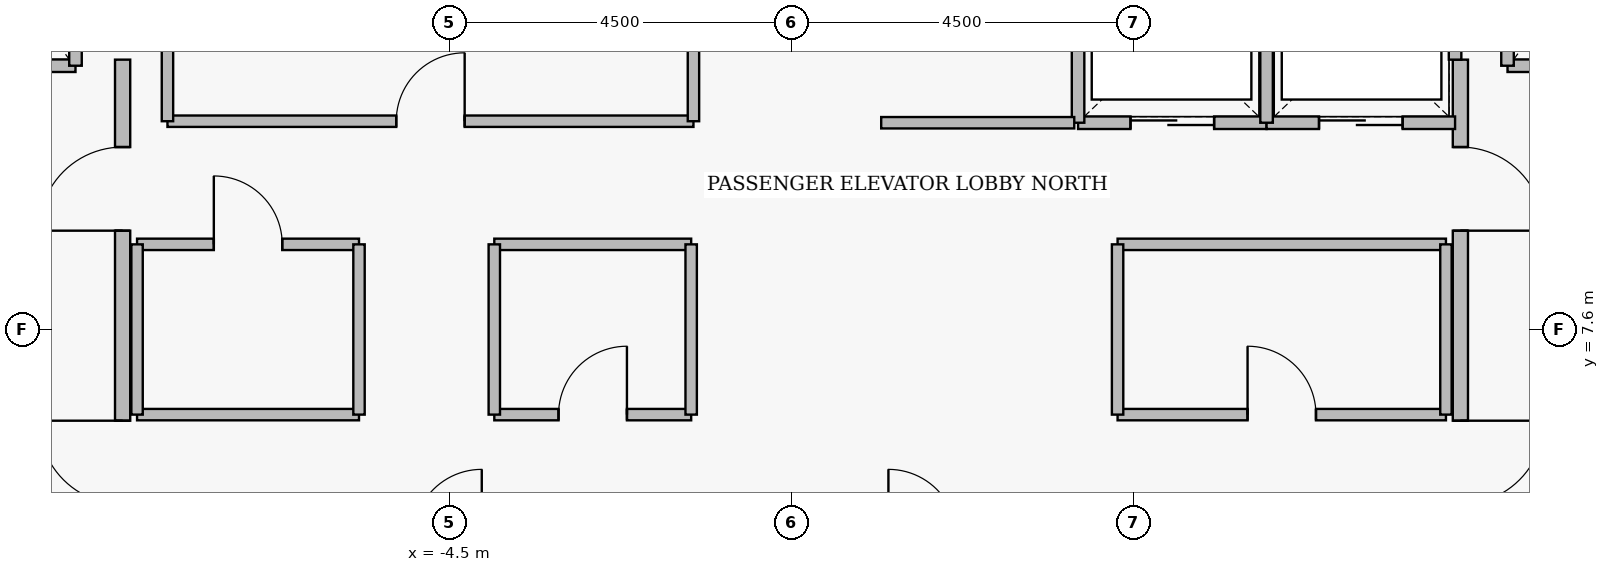
"""IFC4 building model, lengths in metres.
Left out: names, types, materials, properties, quantities, classifications, styles, units other than length and angle.
Written with IfcOpenShell. Run it as: python <this file> out.ifc"""

import sys

from ifc_helpers import new_model, si_unit, direction, frame, frame_2d, origin, place, context, subcontext, project, spatial, rectangle, extrude, element, fill, save


model = new_model("IFC4")
c1 = context("Model", 3, precision=1e-05, world=origin(), true_north=direction((0.0, 1.0)))
c2 = subcontext(c1, "Body", "Model", "MODEL_VIEW")
j1 = project(units=[si_unit("LENGTHUNIT", "METRE"), si_unit("PLANEANGLEUNIT", "RADIAN")], contexts=[c1])
p1 = place(None, origin())
s1 = spatial("IfcSite", under=j1, at=p1, CompositionType="ELEMENT")
p2 = place(p1, origin())
s2 = spatial("IfcBuilding", under=s1, at=p2, CompositionType="ELEMENT")
p3 = place(p2, frame((0.0, 0.0, 288.45)))
s3 = spatial("IfcBuildingStorey", under=s2, at=p3, CompositionType="ELEMENT", Elevation=288.45)
p4 = place(p3, frame((-8.8, 5.05, 0.0), z_axis=(0.0, 0.0, 1.0), x_axis=(0.0, 1.0, 0.0)))
e1 = element("IfcWall", 1, at=p4, inside=s3, PredefinedType="PARTITIONING", context=c2, shape_type="SweptSolid", body=[
    extrude(rectangle(XDim=6.1, YDim=0.2, at=frame_2d((3.05, 0.0))), origin(), (0.0, 0.0, 1.0), 4.18),
])
p5 = place(p4, frame((0.25, 0.0, 0.0)))
e2 = element("IfcOpeningElement", 2, at=p5, cuts=e1, PredefinedType="OPENING", context=c2, shape_type="SweptSolid", body=[
    extrude(rectangle(XDim=1.1, YDim=2.2, at=frame_2d((0.55, 1.1))), frame((0.0, 0.11, 0.0), z_axis=(0.0, -1.0, 0.0), x_axis=(1.0, 0.0, 0.0)), (0.0, 0.0, 1.0), 0.22),
])
p6 = place(p4, frame((3.85, 0.0, 0.0)))
e3 = element("IfcOpeningElement", 3, at=p6, cuts=e1, PredefinedType="OPENING", context=c2, shape_type="SweptSolid", body=[
    extrude(rectangle(XDim=1.1, YDim=2.2, at=frame_2d((0.55, 1.1))), frame((0.0, 0.11, 0.0), z_axis=(0.0, -1.0, 0.0), x_axis=(1.0, 0.0, 0.0)), (0.0, 0.0, 1.0), 0.22),
])
p7 = place(p3, frame((8.8, 11.15, 0.0), z_axis=(0.0, 0.0, 1.0), x_axis=(0.0, -1.0, 0.0)))
e4 = element("IfcWall", 4, at=p7, inside=s3, PredefinedType="PARTITIONING", context=c2, shape_type="SweptSolid", body=[
    extrude(rectangle(XDim=6.1, YDim=0.2, at=frame_2d((3.05, 0.0))), origin(), (0.0, 0.0, 1.0), 4.18),
])
p8 = place(p7, frame((1.15, 0.0, 0.0)))
e5 = element("IfcOpeningElement", 5, at=p8, cuts=e4, PredefinedType="OPENING", context=c2, shape_type="SweptSolid", body=[
    extrude(rectangle(XDim=1.1, YDim=2.2, at=frame_2d((0.55, 1.1))), frame((0.0, 0.11, 0.0), z_axis=(0.0, -1.0, 0.0), x_axis=(1.0, 0.0, 0.0)), (0.0, 0.0, 1.0), 0.22),
])
p9 = place(p7, frame((4.75, 0.0, 0.0)))
e6 = element("IfcOpeningElement", 6, at=p9, cuts=e4, PredefinedType="OPENING", context=c2, shape_type="SweptSolid", body=[
    extrude(rectangle(XDim=1.1, YDim=2.2, at=frame_2d((0.55, 1.1))), frame((0.0, 0.11, 0.0), z_axis=(0.0, -1.0, 0.0), x_axis=(1.0, 0.0, 0.0)), (0.0, 0.0, 1.0), 0.22),
])
p10 = place(p3, frame((-11.58, 11.07, 0.0), z_axis=(0.0, 0.0, 1.0), x_axis=(1.0, 0.0, 0.0)))
e7 = element("IfcWall", 7, at=p10, inside=s3, PredefinedType="PARTITIONING", context=c2, shape_type="SweptSolid", body=[
    extrude(rectangle(XDim=2.16, YDim=0.165, at=frame_2d((1.08, 0.0))), origin(), (0.0, 0.0, 1.0), 4.18),
])
p11 = place(p10, frame((0.53, 0.0, 0.0)))
e8 = element("IfcOpeningElement", 8, at=p11, cuts=e7, PredefinedType="OPENING", context=c2, shape_type="SweptSolid", body=[
    extrude(rectangle(XDim=1.15, YDim=2.25, at=frame_2d((0.575, 1.125))), frame((0.0, 0.093, 0.0), z_axis=(0.0, -1.0, 0.0), x_axis=(1.0, 0.0, 0.0)), (0.0, 0.0, 1.0), 0.185),
])
p12 = place(p3, frame((9.42, 11.07, 0.0), z_axis=(0.0, 0.0, 1.0), x_axis=(1.0, 0.0, 0.0)))
e9 = element("IfcWall", 9, at=p12, inside=s3, PredefinedType="PARTITIONING", context=c2, shape_type="SweptSolid", body=[
    extrude(rectangle(XDim=2.16, YDim=0.165, at=frame_2d((1.08, 0.0))), origin(), (0.0, 0.0, 1.0), 4.18),
])
p13 = place(p12, frame((0.53, 0.0, 0.0)))
e10 = element("IfcOpeningElement", 10, at=p13, cuts=e9, PredefinedType="OPENING", context=c2, shape_type="SweptSolid", body=[
    extrude(rectangle(XDim=1.15, YDim=2.25, at=frame_2d((0.575, 1.125))), frame((0.0, 0.093, 0.0), z_axis=(0.0, -1.0, 0.0), x_axis=(1.0, 0.0, 0.0)), (0.0, 0.0, 1.0), 0.185),
])
p14 = place(p3, frame((3.77, 10.32, 0.0), z_axis=(0.0, 0.0, 1.0), x_axis=(1.0, 0.0, 0.0)))
e11 = element("IfcWall", 11, at=p14, inside=s3, PredefinedType="PARTITIONING", context=c2, shape_type="SweptSolid", body=[
    extrude(rectangle(XDim=2.48, YDim=0.165, at=frame_2d((1.24, 0.0))), origin(), (0.0, 0.0, 1.0), 4.18),
])
p15 = place(p14, frame((0.69, 0.0, 0.0)))
e12 = element("IfcOpeningElement", 12, at=p15, cuts=e11, PredefinedType="OPENING", context=c2, shape_type="SweptSolid", body=[
    extrude(rectangle(XDim=1.1, YDim=2.25, at=frame_2d((0.55, 1.125))), frame((0.0, 0.093, 0.0), z_axis=(0.0, -1.0, 0.0), x_axis=(1.0, 0.0, 0.0)), (0.0, 0.0, 1.0), 0.185),
])
p16 = place(p3, frame((6.25, 10.32, 0.0), z_axis=(0.0, 0.0, 1.0), x_axis=(1.0, 0.0, 0.0)))
e13 = element("IfcWall", 13, at=p16, inside=s3, PredefinedType="PARTITIONING", context=c2, shape_type="SweptSolid", body=[
    extrude(rectangle(XDim=2.48, YDim=0.165, at=frame_2d((1.24, 0.0))), origin(), (0.0, 0.0, 1.0), 4.18),
])
p17 = place(p16, frame((0.69, 0.0, 0.0)))
e14 = element("IfcOpeningElement", 14, at=p17, cuts=e13, PredefinedType="OPENING", context=c2, shape_type="SweptSolid", body=[
    extrude(rectangle(XDim=1.1, YDim=2.25, at=frame_2d((0.55, 1.125))), frame((0.0, 0.093, 0.0), z_axis=(0.0, -1.0, 0.0), x_axis=(1.0, 0.0, 0.0)), (0.0, 0.0, 1.0), 0.185),
])
p18 = place(p3, frame((-8.21, 10.34, 0.0), z_axis=(0.0, 0.0, 1.0), x_axis=(1.0, 0.0, 0.0)))
e15 = element("IfcWall", 15, at=p18, inside=s3, PredefinedType="PARTITIONING", context=c2, shape_type="SweptSolid", body=[
    extrude(rectangle(XDim=6.92, YDim=0.15, at=frame_2d((3.46, 0.0))), origin(), (0.0, 0.0, 1.0), 4.18),
])
p19 = place(p18, frame((3.01, 0.0, 0.0)))
e16 = element("IfcOpeningElement", 16, at=p19, cuts=e15, PredefinedType="OPENING", context=c2, shape_type="SweptSolid", body=[
    extrude(rectangle(XDim=0.9, YDim=2.15, at=frame_2d((0.45, 1.075))), frame((0.0, 0.085, 0.0), z_axis=(0.0, -1.0, 0.0), x_axis=(1.0, 0.0, 0.0)), (0.0, 0.0, 1.0), 0.17),
])
p20 = place(p3, frame((-8.61, 8.72, 0.0), z_axis=(0.0, 0.0, 1.0), x_axis=(1.0, 0.0, 0.0)))
e17 = element("IfcWall", 17, at=p20, inside=s3, PredefinedType="PARTITIONING", context=c2, shape_type="SweptSolid", body=[
    extrude(rectangle(XDim=2.92, YDim=0.15, at=frame_2d((1.46, 0.0))), origin(), (0.0, 0.0, 1.0), 4.18),
])
p21 = place(p20, frame((1.01, 0.0, 0.0)))
e18 = element("IfcOpeningElement", 18, at=p21, cuts=e17, PredefinedType="OPENING", context=c2, shape_type="SweptSolid", body=[
    extrude(rectangle(XDim=0.9, YDim=2.15, at=frame_2d((0.45, 1.075))), frame((0.0, 0.085, 0.0), z_axis=(0.0, -1.0, 0.0), x_axis=(1.0, 0.0, 0.0)), (0.0, 0.0, 1.0), 0.17),
])
p22 = place(p3, frame((-3.91, 6.48, 0.0), z_axis=(0.0, 0.0, 1.0), x_axis=(1.0, 0.0, 0.0)))
e19 = element("IfcWall", 19, at=p22, inside=s3, PredefinedType="PARTITIONING", context=c2, shape_type="SweptSolid", body=[
    extrude(rectangle(XDim=2.59, YDim=0.15, at=frame_2d((1.295, 0.0))), origin(), (0.0, 0.0, 1.0), 4.18),
])
p23 = place(p22, frame((0.845, 0.0, 0.0)))
e20 = element("IfcOpeningElement", 20, at=p23, cuts=e19, PredefinedType="OPENING", context=c2, shape_type="SweptSolid", body=[
    extrude(rectangle(XDim=0.9, YDim=2.15, at=frame_2d((0.45, 1.075))), frame((0.0, 0.085, 0.0), z_axis=(0.0, -1.0, 0.0), x_axis=(1.0, 0.0, 0.0)), (0.0, 0.0, 1.0), 0.17),
])
p24 = place(p3, frame((4.29, 6.48, 0.0), z_axis=(0.0, 0.0, 1.0), x_axis=(1.0, 0.0, 0.0)))
e21 = element("IfcWall", 21, at=p24, inside=s3, PredefinedType="PARTITIONING", context=c2, shape_type="SweptSolid", body=[
    extrude(rectangle(XDim=4.32, YDim=0.15, at=frame_2d((2.16, 0.0))), origin(), (0.0, 0.0, 1.0), 4.18),
])
p25 = place(p24, frame((1.71, 0.0, 0.0)))
e22 = element("IfcOpeningElement", 22, at=p25, cuts=e21, PredefinedType="OPENING", context=c2, shape_type="SweptSolid", body=[
    extrude(rectangle(XDim=0.9, YDim=2.15, at=frame_2d((0.45, 1.075))), frame((0.0, 0.085, 0.0), z_axis=(0.0, -1.0, 0.0), x_axis=(1.0, 0.0, 0.0)), (0.0, 0.0, 1.0), 0.17),
])
for number, where, z_axis, x_axis in (
    (23, (-9.42, 11.07, 0.0), (0.0, 0.0, 1.0), (0.0, 1.0, 0.0)),
    (24, (9.42, 11.07, 0.0), (0.0, 0.0, 1.0), (0.0, 1.0, 0.0)),
):
    element("IfcWall", number, at=place(p3, frame(where, z_axis=z_axis, x_axis=x_axis)), inside=s3, PredefinedType="PARTITIONING", context=c2, shape_type="SweptSolid", body=[
        extrude(rectangle(XDim=2.96, YDim=0.165, at=frame_2d((1.48, 0.0))), origin(), (0.0, 0.0, 1.0), 4.18),
    ])
for number, where, z_axis, x_axis in (
    (25, (3.77, 10.32, 0.0), (0.0, 0.0, 1.0), (0.0, 1.0, 0.0)),
    (26, (6.25, 10.32, 0.0), (0.0, 0.0, 1.0), (0.0, 1.0, 0.0)),
):
    element("IfcWall", number, at=place(p3, frame(where, z_axis=z_axis, x_axis=x_axis)), inside=s3, PredefinedType="PARTITIONING", context=c2, shape_type="SweptSolid", body=[
        extrude(rectangle(XDim=2.36, YDim=0.165, at=frame_2d((1.18, 0.0))), origin(), (0.0, 0.0, 1.0), 4.18),
    ])
p26 = place(p3, frame((8.73, 11.15, 0.0), z_axis=(0.0, 0.0, 1.0), x_axis=(0.0, 1.0, 0.0)))
e27 = element("IfcWall", 27, at=p26, inside=s3, PredefinedType="PARTITIONING", context=c2, shape_type="SweptSolid", body=[
    extrude(rectangle(XDim=1.53, YDim=0.165, at=frame_2d((0.765, 0.0))), origin(), (0.0, 0.0, 1.0), 4.18),
])
for number, where, z_axis, x_axis in (
    (28, (-8.21, 10.34, 0.0), (0.0, 0.0, 1.0), (0.0, 1.0, 0.0)),
    (29, (-1.29, 10.34, 0.0), (0.0, 0.0, 1.0), (0.0, 1.0, 0.0)),
):
    element("IfcWall", number, at=place(p3, frame(where, z_axis=z_axis, x_axis=x_axis)), inside=s3, PredefinedType="PARTITIONING", context=c2, shape_type="SweptSolid", body=[
        extrude(rectangle(XDim=2.52, YDim=0.15, at=frame_2d((1.26, 0.0))), origin(), (0.0, 0.0, 1.0), 4.18),
    ])
p27 = place(p3, frame((-8.61, 6.48, 0.0), z_axis=(0.0, 0.0, 1.0), x_axis=(1.0, 0.0, 0.0)))
e30 = element("IfcWall", 30, at=p27, inside=s3, PredefinedType="PARTITIONING", context=c2, shape_type="SweptSolid", body=[
    extrude(rectangle(XDim=2.92, YDim=0.15, at=frame_2d((1.46, 0.0))), origin(), (0.0, 0.0, 1.0), 4.18),
])
for number, where, z_axis, x_axis in (
    (31, (-8.61, 6.48, 0.0), (0.0, 0.0, 1.0), (0.0, 1.0, 0.0)),
    (32, (-5.69, 6.48, 0.0), (0.0, 0.0, 1.0), (0.0, 1.0, 0.0)),
):
    element("IfcWall", number, at=place(p3, frame(where, z_axis=z_axis, x_axis=x_axis)), inside=s3, PredefinedType="PARTITIONING", context=c2, shape_type="SweptSolid", body=[
        extrude(rectangle(XDim=2.24, YDim=0.15, at=frame_2d((1.12, 0.0))), origin(), (0.0, 0.0, 1.0), 4.18),
    ])
p28 = place(p3, frame((-3.91, 8.72, 0.0), z_axis=(0.0, 0.0, 1.0), x_axis=(1.0, 0.0, 0.0)))
e33 = element("IfcWall", 33, at=p28, inside=s3, PredefinedType="PARTITIONING", context=c2, shape_type="SweptSolid", body=[
    extrude(rectangle(XDim=2.59, YDim=0.15, at=frame_2d((1.295, 0.0))), origin(), (0.0, 0.0, 1.0), 4.18),
])
for number, where, z_axis, x_axis in (
    (34, (-3.91, 6.48, 0.0), (0.0, 0.0, 1.0), (0.0, 1.0, 0.0)),
    (35, (-1.32, 6.48, 0.0), (0.0, 0.0, 1.0), (0.0, 1.0, 0.0)),
):
    element("IfcWall", number, at=place(p3, frame(where, z_axis=z_axis, x_axis=x_axis)), inside=s3, PredefinedType="PARTITIONING", context=c2, shape_type="SweptSolid", body=[
        extrude(rectangle(XDim=2.24, YDim=0.15, at=frame_2d((1.12, 0.0))), origin(), (0.0, 0.0, 1.0), 4.18),
    ])
p29 = place(p3, frame((4.29, 8.72, 0.0), z_axis=(0.0, 0.0, 1.0), x_axis=(1.0, 0.0, 0.0)))
e36 = element("IfcWall", 36, at=p29, inside=s3, PredefinedType="PARTITIONING", context=c2, shape_type="SweptSolid", body=[
    extrude(rectangle(XDim=4.32, YDim=0.15, at=frame_2d((2.16, 0.0))), origin(), (0.0, 0.0, 1.0), 4.18),
])
for number, where, z_axis, x_axis in (
    (37, (4.29, 6.48, 0.0), (0.0, 0.0, 1.0), (0.0, 1.0, 0.0)),
    (38, (8.61, 6.48, 0.0), (0.0, 0.0, 1.0), (0.0, 1.0, 0.0)),
):
    element("IfcWall", number, at=place(p3, frame(where, z_axis=z_axis, x_axis=x_axis)), inside=s3, PredefinedType="PARTITIONING", context=c2, shape_type="SweptSolid", body=[
        extrude(rectangle(XDim=2.24, YDim=0.15, at=frame_2d((1.12, 0.0))), origin(), (0.0, 0.0, 1.0), 4.18),
    ])
p30 = place(p3, frame((1.18, 10.32, 0.0), z_axis=(0.0, 0.0, 1.0), x_axis=(1.0, 0.0, 0.0)))
e39 = element("IfcWall", 39, at=p30, inside=s3, PredefinedType="PARTITIONING", context=c2, shape_type="SweptSolid", body=[
    extrude(rectangle(XDim=2.54, YDim=0.15, at=frame_2d((1.27, 0.0))), origin(), (0.0, 0.0, 1.0), 4.18),
])
p31 = place(p5, origin())
e40 = element("IfcDoor", 40, at=p31, inside=s3, OperationType="SINGLE_SWING_RIGHT", PredefinedType="DOOR", context=c2, shape_type="SweptSolid", body=[
    extrude(rectangle(XDim=1.1, YDim=2.2, at=frame_2d((0.55, 1.1))), frame((0.0, 0.025, 0.0), z_axis=(0.0, -1.0, 0.0), x_axis=(1.0, 0.0, 0.0)), (0.0, 0.0, 1.0), 0.05),
])
fill(e2, e40)
p32 = place(p6, origin())
e41 = element("IfcDoor", 41, at=p32, inside=s3, OperationType="SINGLE_SWING_LEFT", PredefinedType="DOOR", context=c2, shape_type="SweptSolid", body=[
    extrude(rectangle(XDim=1.1, YDim=2.2, at=frame_2d((0.55, 1.1))), frame((0.0, 0.025, 0.0), z_axis=(0.0, -1.0, 0.0), x_axis=(1.0, 0.0, 0.0)), (0.0, 0.0, 1.0), 0.05),
])
fill(e3, e41)
p33 = place(p8, origin())
e42 = element("IfcDoor", 42, at=p33, inside=s3, OperationType="SINGLE_SWING_RIGHT", PredefinedType="DOOR", context=c2, shape_type="SweptSolid", body=[
    extrude(rectangle(XDim=1.1, YDim=2.2, at=frame_2d((0.55, 1.1))), frame((0.0, 0.025, 0.0), z_axis=(0.0, -1.0, 0.0), x_axis=(1.0, 0.0, 0.0)), (0.0, 0.0, 1.0), 0.05),
])
fill(e5, e42)
p34 = place(p9, origin())
e43 = element("IfcDoor", 43, at=p34, inside=s3, OperationType="SINGLE_SWING_LEFT", PredefinedType="DOOR", context=c2, shape_type="SweptSolid", body=[
    extrude(rectangle(XDim=1.1, YDim=2.2, at=frame_2d((0.55, 1.1))), frame((0.0, 0.025, 0.0), z_axis=(0.0, -1.0, 0.0), x_axis=(1.0, 0.0, 0.0)), (0.0, 0.0, 1.0), 0.05),
])
fill(e6, e43)
p35 = place(p15, origin())
e44 = element("IfcDoor", 44, at=p35, inside=s3, OperationType="SLIDING_TO_LEFT", PredefinedType="DOOR", context=c2, shape_type="SweptSolid", body=[
    extrude(rectangle(XDim=1.1, YDim=2.25, at=frame_2d((0.55, 1.125))), frame((0.0, 0.025, 0.0), z_axis=(0.0, -1.0, 0.0), x_axis=(1.0, 0.0, 0.0)), (0.0, 0.0, 1.0), 0.05),
])
fill(e12, e44)
p36 = place(p17, origin())
e45 = element("IfcDoor", 45, at=p36, inside=s3, OperationType="SLIDING_TO_LEFT", PredefinedType="DOOR", context=c2, shape_type="SweptSolid", body=[
    extrude(rectangle(XDim=1.1, YDim=2.25, at=frame_2d((0.55, 1.125))), frame((0.0, 0.025, 0.0), z_axis=(0.0, -1.0, 0.0), x_axis=(1.0, 0.0, 0.0)), (0.0, 0.0, 1.0), 0.05),
])
fill(e14, e45)
p37 = place(p19, origin())
e46 = element("IfcDoor", 46, at=p37, inside=s3, OperationType="SINGLE_SWING_RIGHT", PredefinedType="DOOR", context=c2, shape_type="SweptSolid", body=[
    extrude(rectangle(XDim=0.9, YDim=2.15, at=frame_2d((0.45, 1.075))), frame((0.0, 0.025, 0.0), z_axis=(0.0, -1.0, 0.0), x_axis=(1.0, 0.0, 0.0)), (0.0, 0.0, 1.0), 0.05),
])
fill(e16, e46)
p38 = place(p21, origin())
e47 = element("IfcDoor", 47, at=p38, inside=s3, OperationType="SINGLE_SWING_LEFT", PredefinedType="DOOR", context=c2, shape_type="SweptSolid", body=[
    extrude(rectangle(XDim=0.9, YDim=2.15, at=frame_2d((0.45, 1.075))), frame((0.0, 0.025, 0.0), z_axis=(0.0, -1.0, 0.0), x_axis=(1.0, 0.0, 0.0)), (0.0, 0.0, 1.0), 0.05),
])
fill(e18, e47)
p39 = place(p23, origin())
e48 = element("IfcDoor", 48, at=p39, inside=s3, OperationType="SINGLE_SWING_RIGHT", PredefinedType="DOOR", context=c2, shape_type="SweptSolid", body=[
    extrude(rectangle(XDim=0.9, YDim=2.15, at=frame_2d((0.45, 1.075))), frame((0.0, 0.025, 0.0), z_axis=(0.0, -1.0, 0.0), x_axis=(1.0, 0.0, 0.0)), (0.0, 0.0, 1.0), 0.05),
])
fill(e20, e48)
p40 = place(p25, origin())
e49 = element("IfcDoor", 49, at=p40, inside=s3, OperationType="SINGLE_SWING_LEFT", PredefinedType="DOOR", context=c2, shape_type="SweptSolid", body=[
    extrude(rectangle(XDim=0.9, YDim=2.15, at=frame_2d((0.45, 1.075))), frame((0.0, 0.025, 0.0), z_axis=(0.0, -1.0, 0.0), x_axis=(1.0, 0.0, 0.0)), (0.0, 0.0, 1.0), 0.05),
])
fill(e22, e49)
save(model, sys.argv[1])
